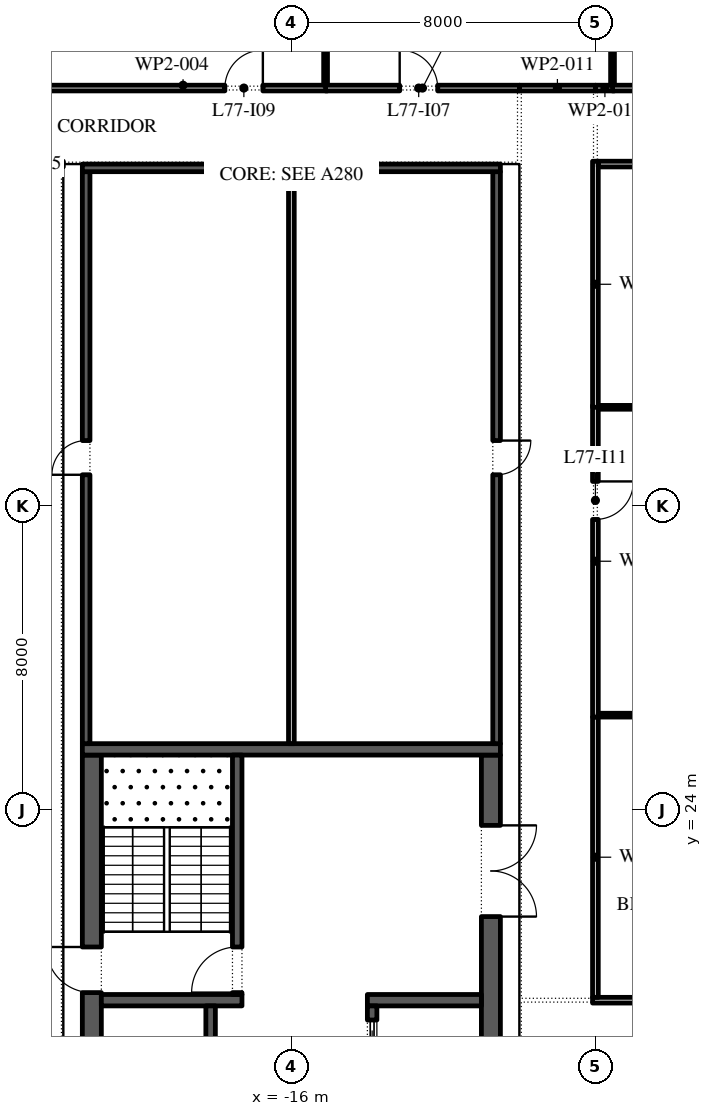
"""IFC4 building model, lengths in metres.
Left out: names, types, materials, properties, quantities, classifications, styles, units other than length and angle.
Written with IfcOpenShell. Run it as: python <this file> out.ifc"""

import sys

from ifc_helpers import new_model, si_unit, direction, frame, frame_2d, origin, place, context, subcontext, project, spatial, rectangle, extrude, element, fill, save


model = new_model("IFC4")
c1 = context("Model", 3, precision=1e-05, world=origin(), true_north=direction((0.0, 1.0)))
c2 = subcontext(c1, "Body", "Model", "MODEL_VIEW")
j1 = project(units=[si_unit("LENGTHUNIT", "METRE"), si_unit("PLANEANGLEUNIT", "RADIAN")], contexts=[c1])
p1 = place(None, origin())
s1 = spatial("IfcSite", under=j1, at=p1, CompositionType="ELEMENT")
p2 = place(p1, origin())
s2 = spatial("IfcBuilding", under=s1, at=p2, CompositionType="ELEMENT")
p3 = place(p2, frame((0.0, 0.0, 351.0)))
s3 = spatial("IfcBuildingStorey", under=s2, at=p3, CompositionType="ELEMENT", Elevation=351.0)
p4 = place(p3, frame((-21.25, -2.45, 0.0), z_axis=(0.0, 0.0, 1.0), x_axis=(0.0, 1.0, 0.0)))
e1 = element("IfcWall", 1, at=p4, inside=s3, PredefinedType="SHEAR", context=c2, shape_type="SweptSolid", body=[
    extrude(rectangle(XDim=27.9, YDim=0.5, at=frame_2d((13.95, 0.0))), origin(), (0.0, 0.0, 1.0), 4.0),
])
p5 = place(p4, frame((5.05, 0.0, 0.0)))
e2 = element("IfcOpeningElement", 2, at=p5, cuts=e1, PredefinedType="OPENING", context=c2, shape_type="SweptSolid", body=[
    extrude(rectangle(XDim=1.2, YDim=2.1, at=frame_2d((0.6, 1.05))), frame((0.0, 0.26, 0.0), z_axis=(0.0, -1.0, 0.0), x_axis=(1.0, 0.0, 0.0)), (0.0, 0.0, 1.0), 0.52),
])
p6 = place(p4, frame((21.65, 0.0, 0.0)))
e3 = element("IfcOpeningElement", 3, at=p6, cuts=e1, PredefinedType="OPENING", context=c2, shape_type="SweptSolid", body=[
    extrude(rectangle(XDim=1.2, YDim=2.1, at=frame_2d((0.6, 1.05))), frame((0.0, 0.26, 0.0), z_axis=(0.0, -1.0, 0.0), x_axis=(1.0, 0.0, 0.0)), (0.0, 0.0, 1.0), 0.52),
])
p7 = place(p3, frame((-10.75, -2.45, 0.0), z_axis=(0.0, 0.0, 1.0), x_axis=(0.0, 1.0, 0.0)))
e4 = element("IfcWall", 4, at=p7, inside=s3, PredefinedType="SHEAR", context=c2, shape_type="SweptSolid", body=[
    extrude(rectangle(XDim=27.9, YDim=0.5, at=frame_2d((13.95, 0.0))), origin(), (0.0, 0.0, 1.0), 4.0),
])
p8 = place(p7, frame((23.65, 0.0, 0.0)))
e5 = element("IfcOpeningElement", 5, at=p8, cuts=e4, PredefinedType="OPENING", context=c2, shape_type="SweptSolid", body=[
    extrude(rectangle(XDim=2.4, YDim=2.1, at=frame_2d((1.2, 1.05))), frame((0.0, 0.26, 0.0), z_axis=(0.0, -1.0, 0.0), x_axis=(1.0, 0.0, 0.0)), (0.0, 0.0, 1.0), 0.52),
])
p9 = place(p7, frame((1.387, 0.0, 0.0)))
e6 = element("IfcOpeningElement", 6, at=p9, cuts=e4, PredefinedType="OPENING", context=c2, shape_type="SweptSolid", body=[
    extrude(rectangle(XDim=0.9, YDim=2.1, at=frame_2d((0.45, 1.05))), frame((0.0, 0.26, 0.0), z_axis=(0.0, -1.0, 0.0), x_axis=(1.0, 0.0, 0.0)), (0.0, 0.0, 1.0), 0.52),
])
p10 = place(p7, frame((4.562, 0.0, 0.0)))
e7 = element("IfcOpeningElement", 7, at=p10, cuts=e4, PredefinedType="OPENING", context=c2, shape_type="SweptSolid", body=[
    extrude(rectangle(XDim=1.0, YDim=2.1, at=frame_2d((0.5, 1.05))), frame((0.0, 0.26, 0.0), z_axis=(0.0, -1.0, 0.0), x_axis=(1.0, 0.0, 0.0)), (0.0, 0.0, 1.0), 0.52),
])
p11 = place(p3, frame((-21.5, 25.6, 0.0), z_axis=(0.0, 0.0, 1.0), x_axis=(1.0, 0.0, 0.0)))
e8 = element("IfcWall", 8, at=p11, inside=s3, PredefinedType="SHEAR", context=c2, shape_type="SweptSolid", body=[
    extrude(rectangle(XDim=11.0, YDim=0.3, at=frame_2d((5.5, 0.0))), origin(), (0.0, 0.0, 1.0), 4.0),
])
p12 = place(p3, frame((-21.0, 19.0, 0.0), z_axis=(0.0, 0.0, 1.0), x_axis=(1.0, 0.0, 0.0)))
e9 = element("IfcWall", 9, at=p12, inside=s3, PredefinedType="SHEAR", context=c2, shape_type="SweptSolid", body=[
    extrude(rectangle(XDim=3.7, YDim=0.3, at=frame_2d((1.85, 0.0))), origin(), (0.0, 0.0, 1.0), 4.0),
])
p13 = place(p3, frame((-17.425, 19.15, 0.0), z_axis=(0.0, 0.0, 1.0), x_axis=(0.0, 1.0, 0.0)))
e10 = element("IfcWall", 10, at=p13, inside=s3, PredefinedType="SHEAR", context=c2, shape_type="SweptSolid", body=[
    extrude(rectangle(XDim=6.3, YDim=0.25, at=frame_2d((3.15, 0.0))), origin(), (0.0, 0.0, 1.0), 4.0),
])
p14 = place(p13, frame((0.05, 0.0, 0.0)))
e11 = element("IfcOpeningElement", 11, at=p14, cuts=e10, PredefinedType="OPENING", context=c2, shape_type="SweptSolid", body=[
    extrude(rectangle(XDim=1.2, YDim=2.1, at=frame_2d((0.6, 1.05))), frame((0.0, 0.135, 0.0), z_axis=(0.0, -1.0, 0.0), x_axis=(1.0, 0.0, 0.0)), (0.0, 0.0, 1.0), 0.27),
])
p15 = place(p3, frame((-18.125, 4.15, 0.0), z_axis=(0.0, 0.0, 1.0), x_axis=(0.0, 1.0, 0.0)))
e12 = element("IfcWall", 12, at=p15, inside=s3, PredefinedType="SHEAR", context=c2, shape_type="SweptSolid", body=[
    extrude(rectangle(XDim=14.7, YDim=0.25, at=frame_2d((7.35, 0.0))), origin(), (0.0, 0.0, 1.0), 4.0),
])
p16 = place(p15, frame((3.796, 0.0, 0.0)))
e13 = element("IfcOpeningElement", 13, at=p16, cuts=e12, PredefinedType="OPENING", context=c2, shape_type="SweptSolid", body=[
    extrude(rectangle(XDim=0.9, YDim=2.1, at=frame_2d((0.45, 1.05))), frame((0.0, 0.135, 0.0), z_axis=(0.0, -1.0, 0.0), x_axis=(1.0, 0.0, 0.0)), (0.0, 0.0, 1.0), 0.27),
])
p17 = place(p15, frame((8.0, 0.0, 0.0)))
e14 = element("IfcOpeningElement", 14, at=p17, cuts=e12, PredefinedType="OPENING", context=c2, shape_type="SweptSolid", body=[
    extrude(rectangle(XDim=0.9, YDim=2.1, at=frame_2d((0.45, 1.05))), frame((0.0, 0.135, 0.0), z_axis=(0.0, -1.0, 0.0), x_axis=(1.0, 0.0, 0.0)), (0.0, 0.0, 1.0), 0.27),
])
p18 = place(p15, frame((12.175, 0.0, 0.0)))
e15 = element("IfcOpeningElement", 15, at=p18, cuts=e12, PredefinedType="OPENING", context=c2, shape_type="SweptSolid", body=[
    extrude(rectangle(XDim=0.9, YDim=2.1, at=frame_2d((0.45, 1.05))), frame((0.0, 0.135, 0.0), z_axis=(0.0, -1.0, 0.0), x_axis=(1.0, 0.0, 0.0)), (0.0, 0.0, 1.0), 0.27),
])
p19 = place(p15, frame((0.371, 0.0, 0.0)))
e16 = element("IfcOpeningElement", 16, at=p19, cuts=e12, PredefinedType="OPENING", context=c2, shape_type="SweptSolid", body=[
    extrude(rectangle(XDim=1.1, YDim=2.1, at=frame_2d((0.55, 1.05))), frame((0.0, 0.135, 0.0), z_axis=(0.0, -1.0, 0.0), x_axis=(1.0, 0.0, 0.0)), (0.0, 0.0, 1.0), 0.27),
])
p20 = place(p3, frame((-14.0, 19.0, 0.0), z_axis=(0.0, 0.0, 1.0), x_axis=(1.0, 0.0, 0.0)))
e17 = element("IfcWall", 17, at=p20, inside=s3, PredefinedType="SHEAR", context=c2, shape_type="SweptSolid", body=[
    extrude(rectangle(XDim=3.0, YDim=0.3, at=frame_2d((1.5, 0.0))), origin(), (0.0, 0.0, 1.0), 4.0),
])
p21 = place(p3, frame((-13.875, -2.45, 0.0), z_axis=(0.0, 0.0, 1.0), x_axis=(0.0, 1.0, 0.0)))
e18 = element("IfcWall", 18, at=p21, inside=s3, PredefinedType="SHEAR", context=c2, shape_type="SweptSolid", body=[
    extrude(rectangle(XDim=21.3, YDim=0.25, at=frame_2d((10.65, 0.0))), origin(), (0.0, 0.0, 1.0), 4.0),
])
p22 = place(p21, frame((9.846, 0.0, 0.0)))
e19 = element("IfcOpeningElement", 19, at=p22, cuts=e18, PredefinedType="OPENING", context=c2, shape_type="SweptSolid", body=[
    extrude(rectangle(XDim=0.9, YDim=2.1, at=frame_2d((0.45, 1.05))), frame((0.0, 0.135, 0.0), z_axis=(0.0, -1.0, 0.0), x_axis=(1.0, 0.0, 0.0)), (0.0, 0.0, 1.0), 0.27),
])
p23 = place(p21, frame((12.911, 0.0, 0.0)))
e20 = element("IfcOpeningElement", 20, at=p23, cuts=e18, PredefinedType="OPENING", context=c2, shape_type="SweptSolid", body=[
    extrude(rectangle(XDim=0.9, YDim=2.1, at=frame_2d((0.45, 1.05))), frame((0.0, 0.135, 0.0), z_axis=(0.0, -1.0, 0.0), x_axis=(1.0, 0.0, 0.0)), (0.0, 0.0, 1.0), 0.27),
])
p24 = place(p21, frame((6.971, 0.0, 0.0)))
e21 = element("IfcOpeningElement", 21, at=p24, cuts=e18, PredefinedType="OPENING", context=c2, shape_type="SweptSolid", body=[
    extrude(rectangle(XDim=1.1, YDim=2.1, at=frame_2d((0.55, 1.05))), frame((0.0, 0.135, 0.0), z_axis=(0.0, -1.0, 0.0), x_axis=(1.0, 0.0, 0.0)), (0.0, 0.0, 1.0), 0.27),
])
p25 = place(p21, frame((15.543, 0.0, 0.0)))
e22 = element("IfcOpeningElement", 22, at=p25, cuts=e18, PredefinedType="OPENING", context=c2, shape_type="SweptSolid", body=[
    extrude(rectangle(XDim=1.1, YDim=2.1, at=frame_2d((0.55, 1.05))), frame((0.0, 0.135, 0.0), z_axis=(0.0, -1.0, 0.0), x_axis=(1.0, 0.0, 0.0)), (0.0, 0.0, 1.0), 0.27),
])
p26 = place(p21, frame((17.686, 0.0, 0.0)))
e23 = element("IfcOpeningElement", 23, at=p26, cuts=e18, PredefinedType="OPENING", context=c2, shape_type="SweptSolid", body=[
    extrude(rectangle(XDim=1.1, YDim=2.1, at=frame_2d((0.55, 1.05))), frame((0.0, 0.135, 0.0), z_axis=(0.0, -1.0, 0.0), x_axis=(1.0, 0.0, 0.0)), (0.0, 0.0, 1.0), 0.27),
])
p27 = place(p21, frame((19.829, 0.0, 0.0)))
e24 = element("IfcOpeningElement", 24, at=p27, cuts=e18, PredefinedType="OPENING", context=c2, shape_type="SweptSolid", body=[
    extrude(rectangle(XDim=1.1, YDim=2.1, at=frame_2d((0.55, 1.05))), frame((0.0, 0.135, 0.0), z_axis=(0.0, -1.0, 0.0), x_axis=(1.0, 0.0, 0.0)), (0.0, 0.0, 1.0), 0.27),
])
p28 = place(p3, frame((-21.4, 25.75, 0.0), z_axis=(0.0, 0.0, 1.0), x_axis=(0.0, 1.0, 0.0)))
e25 = element("IfcWall", 25, at=p28, inside=s3, PredefinedType="SHEAR", context=c2, shape_type="SweptSolid", body=[
    extrude(rectangle(XDim=15.05, YDim=0.2, at=frame_2d((7.525, 0.0))), origin(), (0.0, 0.0, 1.0), 4.0),
])
p29 = place(p28, frame((7.075, 0.0, 0.0)))
e26 = element("IfcOpeningElement", 26, at=p29, cuts=e25, PredefinedType="OPENING", context=c2, shape_type="SweptSolid", body=[
    extrude(rectangle(XDim=0.9, YDim=2.1, at=frame_2d((0.45, 1.05))), frame((0.0, 0.11, 0.0), z_axis=(0.0, -1.0, 0.0), x_axis=(1.0, 0.0, 0.0)), (0.0, 0.0, 1.0), 0.22),
])
p30 = place(p3, frame((-10.6, 25.75, 0.0), z_axis=(0.0, 0.0, 1.0), x_axis=(0.0, 1.0, 0.0)))
e27 = element("IfcWall", 27, at=p30, inside=s3, PredefinedType="SHEAR", context=c2, shape_type="SweptSolid", body=[
    extrude(rectangle(XDim=15.05, YDim=0.2, at=frame_2d((7.525, 0.0))), origin(), (0.0, 0.0, 1.0), 4.0),
])
p31 = place(p30, frame((7.075, 0.0, 0.0)))
e28 = element("IfcOpeningElement", 28, at=p31, cuts=e27, PredefinedType="OPENING", context=c2, shape_type="SweptSolid", body=[
    extrude(rectangle(XDim=0.9, YDim=2.1, at=frame_2d((0.45, 1.05))), frame((0.0, 0.11, 0.0), z_axis=(0.0, -1.0, 0.0), x_axis=(1.0, 0.0, 0.0)), (0.0, 0.0, 1.0), 0.22),
])
p32 = place(p3, frame((-21.5, 40.9, 0.0), z_axis=(0.0, 0.0, 1.0), x_axis=(1.0, 0.0, 0.0)))
e29 = element("IfcWall", 29, at=p32, inside=s3, PredefinedType="SHEAR", context=c2, shape_type="SweptSolid", body=[
    extrude(rectangle(XDim=11.0, YDim=0.2, at=frame_2d((5.5, 0.0))), origin(), (0.0, 0.0, 1.0), 4.0),
])
p33 = place(p3, frame((-16.0, 25.75, 0.0), z_axis=(0.0, 0.0, 1.0), x_axis=(0.0, 1.0, 0.0)))
e30 = element("IfcWall", 30, at=p33, inside=s3, PredefinedType="PARTITIONING", context=c2, shape_type="SweptSolid", body=[
    extrude(rectangle(XDim=15.05, YDim=0.15, at=frame_2d((7.525, 0.0))), origin(), (0.0, 0.0, 1.0), 4.0),
])
p34 = place(p3, frame((-22.65, 43.0, 0.0), z_axis=(0.0, 0.0, 1.0), x_axis=(1.0, 0.0, 0.0)))
e31 = element("IfcWall", 31, at=p34, inside=s3, PredefinedType="PARTITIONING", context=c2, shape_type="SweptSolid", body=[
    extrude(rectangle(XDim=7.6, YDim=0.15, at=frame_2d((3.8, 0.0))), origin(), (0.0, 0.0, 1.0), 4.0),
])
p35 = place(p34, frame((4.9, 0.0, 0.0)))
e32 = element("IfcOpeningElement", 32, at=p35, cuts=e31, PredefinedType="OPENING", context=c2, shape_type="SweptSolid", body=[
    extrude(rectangle(XDim=1.0, YDim=2.1, at=frame_2d((0.5, 1.05))), frame((0.0, 0.085, 0.0), z_axis=(0.0, -1.0, 0.0), x_axis=(1.0, 0.0, 0.0)), (0.0, 0.0, 1.0), 0.17),
])
p36 = place(p3, frame((-22.0, 41.0, 0.0), z_axis=(0.0, 0.0, 1.0), x_axis=(-1.0, 0.0, 0.0)))
e33 = element("IfcWall", 33, at=p36, inside=s3, PredefinedType="PARTITIONING", context=c2, shape_type="SweptSolid", body=[
    extrude(rectangle(XDim=4.05, YDim=0.15, at=frame_2d((2.025, 0.0))), origin(), (0.0, 0.0, 1.0), 4.0),
])
p37 = place(p36, frame((2.6, 0.0, 0.0)))
e34 = element("IfcOpeningElement", 34, at=p37, cuts=e33, PredefinedType="OPENING", context=c2, shape_type="SweptSolid", body=[
    extrude(rectangle(XDim=1.0, YDim=2.1, at=frame_2d((0.5, 1.05))), frame((0.0, 0.085, 0.0), z_axis=(0.0, -1.0, 0.0), x_axis=(1.0, 0.0, 0.0)), (0.0, 0.0, 1.0), 0.17),
])
p38 = place(p3, frame((-15.1, 43.075, 0.0), z_axis=(0.0, 0.0, 1.0), x_axis=(0.0, 1.0, 0.0)))
e35 = element("IfcWall", 35, at=p38, inside=s3, PredefinedType="PARTITIONING", context=c2, shape_type="SweptSolid", body=[
    extrude(rectangle(XDim=3.875, YDim=0.1, at=frame_2d((1.938, 0.0))), origin(), (0.0, 0.0, 1.0), 4.0),
])
p39 = place(p3, frame((-15.1, 43.0, 0.0), z_axis=(0.0, 0.0, 1.0), x_axis=(1.0, 0.0, 0.0)))
e36 = element("IfcWall", 36, at=p39, inside=s3, PredefinedType="PARTITIONING", context=c2, shape_type="SweptSolid", body=[
    extrude(rectangle(XDim=5.1, YDim=0.15, at=frame_2d((2.55, 0.0))), origin(), (0.0, 0.0, 1.0), 4.0),
])
p40 = place(p39, frame((1.95, 0.0, 0.0)))
e37 = element("IfcOpeningElement", 37, at=p40, cuts=e36, PredefinedType="OPENING", context=c2, shape_type="SweptSolid", body=[
    extrude(rectangle(XDim=1.0, YDim=2.1, at=frame_2d((0.5, 1.05))), frame((0.0, 0.085, 0.0), z_axis=(0.0, -1.0, 0.0), x_axis=(1.0, 0.0, 0.0)), (0.0, 0.0, 1.0), 0.17),
])
p41 = place(p3, frame((-10.0, 43.0, 0.0), z_axis=(0.0, 0.0, 1.0), x_axis=(1.0, 0.0, 0.0)))
e38 = element("IfcWall", 38, at=p41, inside=s3, PredefinedType="PARTITIONING", context=c2, shape_type="SweptSolid", body=[
    extrude(rectangle(XDim=2.0, YDim=0.15, at=frame_2d((1.0, 0.0))), origin(), (0.0, 0.0, 1.0), 4.0),
])
p42 = place(p3, frame((-8.075, 19.0, 0.0), z_axis=(0.0, 0.0, 1.0), x_axis=(1.0, 0.0, 0.0)))
e39 = element("IfcWall", 39, at=p42, inside=s3, PredefinedType="PARTITIONING", context=c2, shape_type="SweptSolid", body=[
    extrude(rectangle(XDim=8.125, YDim=0.15, at=frame_2d((4.062, 0.0))), origin(), (0.0, 0.0, 1.0), 4.0),
])
p43 = place(p42, frame((4.425, 0.0, 0.0)))
e40 = element("IfcOpeningElement", 40, at=p43, cuts=e39, PredefinedType="OPENING", context=c2, shape_type="SweptSolid", body=[
    extrude(rectangle(XDim=1.0, YDim=2.1, at=frame_2d((0.5, 1.05))), frame((0.0, 0.085, 0.0), z_axis=(0.0, -1.0, 0.0), x_axis=(1.0, 0.0, 0.0)), (0.0, 0.0, 1.0), 0.17),
])
p44 = place(p3, frame((-8.0, 26.45, 0.0), z_axis=(0.0, 0.0, 1.0), x_axis=(0.0, -1.0, 0.0)))
e41 = element("IfcWall", 41, at=p44, inside=s3, PredefinedType="PARTITIONING", context=c2, shape_type="SweptSolid", body=[
    extrude(rectangle(XDim=7.375, YDim=0.15, at=frame_2d((3.688, 0.0))), origin(), (0.0, 0.0, 1.0), 4.0),
])
p45 = place(p3, frame((-8.0, 34.65, 0.0), z_axis=(0.0, 0.0, 1.0), x_axis=(0.0, -1.0, 0.0)))
e42 = element("IfcWall", 42, at=p45, inside=s3, PredefinedType="PARTITIONING", context=c2, shape_type="SweptSolid", body=[
    extrude(rectangle(XDim=8.2, YDim=0.15, at=frame_2d((4.1, 0.0))), origin(), (0.0, 0.0, 1.0), 4.0),
])
p46 = place(p45, frame((2.0, 0.0, 0.0)))
e43 = element("IfcOpeningElement", 43, at=p46, cuts=e42, PredefinedType="OPENING", context=c2, shape_type="SweptSolid", body=[
    extrude(rectangle(XDim=1.0, YDim=2.1, at=frame_2d((0.5, 1.05))), frame((0.0, 0.085, 0.0), z_axis=(0.0, -1.0, 0.0), x_axis=(1.0, 0.0, 0.0)), (0.0, 0.0, 1.0), 0.17),
])
p47 = place(p3, frame((-7.925, 34.6, 0.0), z_axis=(0.0, 0.0, 1.0), x_axis=(1.0, 0.0, 0.0)))
e44 = element("IfcWall", 44, at=p47, inside=s3, PredefinedType="PARTITIONING", context=c2, shape_type="SweptSolid", body=[
    extrude(rectangle(XDim=16.0, YDim=0.1, at=frame_2d((8.0, 0.0))), origin(), (0.0, 0.0, 1.0), 4.0),
])
p48 = place(p3, frame((-8.0, 41.075, 0.0), z_axis=(0.0, 0.0, 1.0), x_axis=(0.0, -1.0, 0.0)))
e45 = element("IfcWall", 45, at=p48, inside=s3, PredefinedType="PARTITIONING", context=c2, shape_type="SweptSolid", body=[
    extrude(rectangle(XDim=6.475, YDim=0.15, at=frame_2d((3.237, 0.0))), origin(), (0.0, 0.0, 1.0), 4.0),
])
p49 = place(p3, frame((-8.0, 43.0, 0.0), z_axis=(0.0, 0.0, 1.0), x_axis=(1.0, 0.0, 0.0)))
e46 = element("IfcWall", 46, at=p49, inside=s3, PredefinedType="PARTITIONING", context=c2, shape_type="SweptSolid", body=[
    extrude(rectangle(XDim=0.5, YDim=0.15, at=frame_2d((0.25, 0.0))), origin(), (0.0, 0.0, 1.0), 4.0),
])
p50 = place(p3, frame((-7.55, 43.075, 0.0), z_axis=(0.0, 0.0, 1.0), x_axis=(0.0, 1.0, 0.0)))
e47 = element("IfcWall", 47, at=p50, inside=s3, PredefinedType="PARTITIONING", context=c2, shape_type="SweptSolid", body=[
    extrude(rectangle(XDim=3.875, YDim=0.1, at=frame_2d((1.938, 0.0))), origin(), (0.0, 0.0, 1.0), 3.096),
])
p51 = place(p3, frame((-7.55, 43.0, 0.0), z_axis=(0.0, 0.0, 1.0), x_axis=(1.0, 0.0, 0.0)))
e48 = element("IfcWall", 48, at=p51, inside=s3, PredefinedType="PARTITIONING", context=c2, shape_type="SweptSolid", body=[
    extrude(rectangle(XDim=7.6, YDim=0.15, at=frame_2d((3.8, 0.0))), origin(), (0.0, 0.0, 1.0), 4.0),
])
p52 = place(p51, frame((4.15, 0.0, 0.0)))
e49 = element("IfcOpeningElement", 49, at=p52, cuts=e48, PredefinedType="OPENING", context=c2, shape_type="SweptSolid", body=[
    extrude(rectangle(XDim=1.0, YDim=2.1, at=frame_2d((0.5, 1.05))), frame((0.0, 0.085, 0.0), z_axis=(0.0, -1.0, 0.0), x_axis=(1.0, 0.0, 0.0)), (0.0, 0.0, 1.0), 0.17),
])
p53 = place(p3, frame((-0.05, 26.5, 0.0), z_axis=(0.0, 0.0, 1.0), x_axis=(-1.0, 0.0, 0.0)))
e50 = element("IfcWall", 50, at=p53, inside=s3, PredefinedType="PARTITIONING", context=c2, shape_type="SweptSolid", body=[
    extrude(rectangle(XDim=7.875, YDim=0.1, at=frame_2d((3.938, 0.0))), origin(), (0.0, 0.0, 1.0), 4.0),
])
p54 = place(p3, frame((7.925, 41.0, 0.0), z_axis=(0.0, 0.0, 1.0), x_axis=(-1.0, 0.0, 0.0)))
e51 = element("IfcWall", 51, at=p54, inside=s3, PredefinedType="PARTITIONING", context=c2, shape_type="SweptSolid", body=[
    extrude(rectangle(XDim=15.85, YDim=0.15, at=frame_2d((7.925, 0.0))), origin(), (0.0, 0.0, 1.0), 4.0),
])
p55 = place(p54, frame((9.025, 0.0, 0.0)))
e52 = element("IfcOpeningElement", 52, at=p55, cuts=e51, PredefinedType="OPENING", context=c2, shape_type="SweptSolid", body=[
    extrude(rectangle(XDim=1.0, YDim=2.1, at=frame_2d((0.5, 1.05))), frame((0.0, 0.085, 0.0), z_axis=(0.0, -1.0, 0.0), x_axis=(1.0, 0.0, 0.0)), (0.0, 0.0, 1.0), 0.17),
])
p56 = place(p27, origin())
e53 = element("IfcDoor", 53, at=p56, inside=s3, OperationType="SLIDING_TO_LEFT", PredefinedType="DOOR", context=c2, shape_type="SweptSolid", body=[
    extrude(rectangle(XDim=1.1, YDim=2.1, at=frame_2d((0.55, 1.05))), frame((0.0, 0.025, 0.0), z_axis=(0.0, -1.0, 0.0), x_axis=(1.0, 0.0, 0.0)), (0.0, 0.0, 1.0), 0.05),
])
fill(e24, e53)
p57 = place(p8, frame((2.4, 0.0, 0.0), z_axis=(0.0, 0.0, 1.0), x_axis=(-1.0, 0.0, 0.0)))
e54 = element("IfcDoor", 54, at=p57, inside=s3, OperationType="DOUBLE_DOOR_SINGLE_SWING", PredefinedType="DOOR", context=c2, shape_type="SweptSolid", body=[
    extrude(rectangle(XDim=2.4, YDim=2.1, at=frame_2d((1.2, 1.05))), frame((0.0, 0.025, 0.0), z_axis=(0.0, -1.0, 0.0), x_axis=(1.0, 0.0, 0.0)), (0.0, 0.0, 1.0), 0.05),
])
fill(e5, e54)
p58 = place(p14, origin())
e55 = element("IfcDoor", 55, at=p58, inside=s3, OperationType="SINGLE_SWING_RIGHT", PredefinedType="DOOR", context=c2, shape_type="SweptSolid", body=[
    extrude(rectangle(XDim=1.2, YDim=2.1, at=frame_2d((0.6, 1.05))), frame((0.0, 0.025, 0.0), z_axis=(0.0, -1.0, 0.0), x_axis=(1.0, 0.0, 0.0)), (0.0, 0.0, 1.0), 0.05),
])
fill(e11, e55)
p59 = place(p6, origin())
e56 = element("IfcDoor", 56, at=p59, inside=s3, OperationType="SINGLE_SWING_LEFT", PredefinedType="DOOR", context=c2, shape_type="SweptSolid", body=[
    extrude(rectangle(XDim=1.2, YDim=2.1, at=frame_2d((0.6, 1.05))), frame((0.0, 0.025, 0.0), z_axis=(0.0, -1.0, 0.0), x_axis=(1.0, 0.0, 0.0)), (0.0, 0.0, 1.0), 0.05),
])
fill(e3, e56)
p60 = place(p29, origin())
e57 = element("IfcDoor", 57, at=p60, inside=s3, OperationType="SINGLE_SWING_RIGHT", PredefinedType="DOOR", context=c2, shape_type="SweptSolid", body=[
    extrude(rectangle(XDim=0.9, YDim=2.1, at=frame_2d((0.45, 1.05))), frame((0.0, -0.05, 0.0), z_axis=(0.0, -1.0, 0.0), x_axis=(1.0, 0.0, 0.0)), (0.0, 0.0, 1.0), 0.05),
])
fill(e26, e57)
p61 = place(p31, frame((0.9, 0.15, 0.0), z_axis=(0.0, 0.0, 1.0), x_axis=(-1.0, 0.0, 0.0)))
e58 = element("IfcDoor", 58, at=p61, inside=s3, OperationType="SINGLE_SWING_RIGHT", PredefinedType="DOOR", context=c2, shape_type="SweptSolid", body=[
    extrude(rectangle(XDim=0.9, YDim=2.1, at=frame_2d((0.45, 1.05))), frame((0.0, 0.1, 0.0), z_axis=(0.0, -1.0, 0.0), x_axis=(1.0, 0.0, 0.0)), (0.0, 0.0, 1.0), 0.05),
])
fill(e28, e58)
p62 = place(p40, origin())
e59 = element("IfcDoor", 59, at=p62, inside=s3, OperationType="SINGLE_SWING_RIGHT", PredefinedType="DOOR", context=c2, shape_type="SweptSolid", body=[
    extrude(rectangle(XDim=1.0, YDim=2.1, at=frame_2d((0.5, 1.05))), frame((0.0, 0.025, 0.0), z_axis=(0.0, -1.0, 0.0), x_axis=(1.0, 0.0, 0.0)), (0.0, 0.0, 1.0), 0.05),
])
fill(e37, e59)
p63 = place(p35, origin())
e60 = element("IfcDoor", 60, at=p63, inside=s3, OperationType="SINGLE_SWING_LEFT", PredefinedType="DOOR", context=c2, shape_type="SweptSolid", body=[
    extrude(rectangle(XDim=1.0, YDim=2.1, at=frame_2d((0.5, 1.05))), frame((0.0, 0.025, 0.0), z_axis=(0.0, -1.0, 0.0), x_axis=(1.0, 0.0, 0.0)), (0.0, 0.0, 1.0), 0.05),
])
fill(e32, e60)
p64 = place(p46, origin())
e61 = element("IfcDoor", 61, at=p64, inside=s3, OperationType="SINGLE_SWING_RIGHT", PredefinedType="DOOR", context=c2, shape_type="SweptSolid", body=[
    extrude(rectangle(XDim=1.0, YDim=2.1, at=frame_2d((0.5, 1.05))), frame((0.0, 0.025, 0.0), z_axis=(0.0, -1.0, 0.0), x_axis=(1.0, 0.0, 0.0)), (0.0, 0.0, 1.0), 0.05),
])
fill(e43, e61)
save(model, sys.argv[1])
